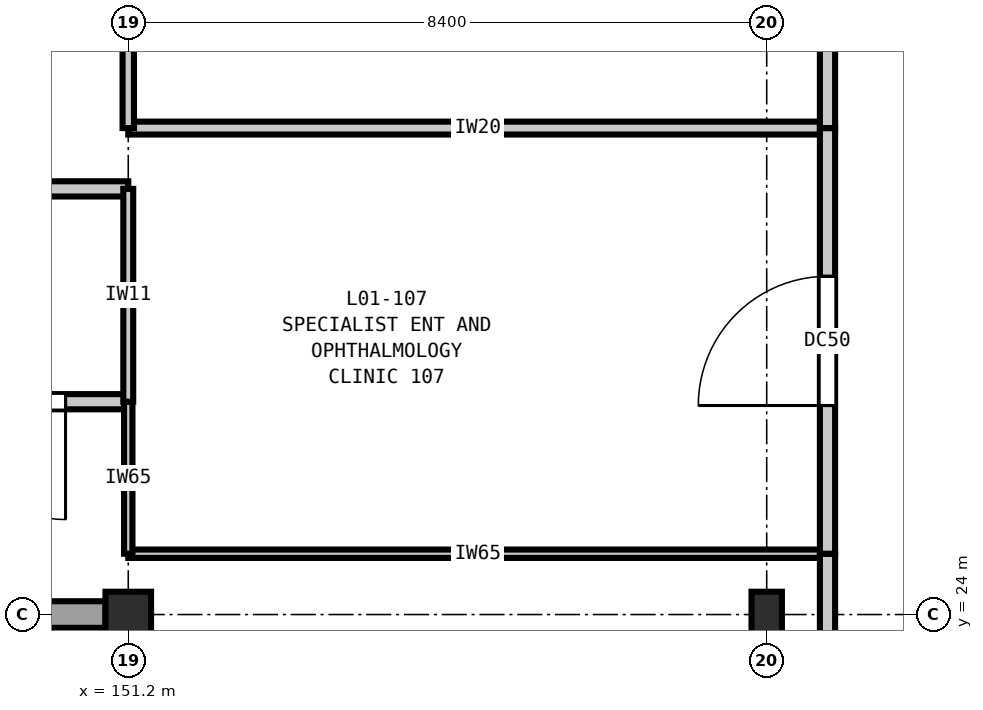
"""IFC4 building model, lengths in metres.
Left out: names, types, materials, properties, quantities, classifications, styles, units other than length and angle.
Written with IfcOpenShell. Run it as: python <this file> out.ifc"""

import sys

from ifc_helpers import new_model, si_unit, direction, frame, frame_2d, origin, origin_2d, place, context, subcontext, project, spatial, rectangle, extrude, element, fill, save


model = new_model("IFC4")
c1 = context("Model", 3, precision=1e-05, world=origin(), true_north=direction((0.0, 1.0)))
c2 = subcontext(c1, "Body", "Model", "MODEL_VIEW")
j1 = project(units=[si_unit("LENGTHUNIT", "METRE"), si_unit("PLANEANGLEUNIT", "RADIAN")], contexts=[c1])
p1 = place(None, origin())
s1 = spatial("IfcSite", under=j1, at=p1, CompositionType="ELEMENT")
p2 = place(p1, origin())
s2 = spatial("IfcBuilding", under=s1, at=p2, CompositionType="ELEMENT")
p3 = place(p2, frame((0.0, 0.0, 5.4)))
s3 = spatial("IfcBuildingStorey", under=s2, at=p3, CompositionType="ELEMENT", Elevation=5.4)
p4 = place(p3, frame((151.2, 24.0, 0.0), z_axis=(0.0, 0.0, 1.0), x_axis=(1.0, 0.0, 0.0)))
e1 = element("IfcColumn", 1, at=p4, inside=s3, PredefinedType="COLUMN", context=c2, shape_type="SweptSolid", body=[
    extrude(rectangle(XDim=0.6, YDim=0.6, at=origin_2d()), origin(), (0.0, 0.0, 1.0), 5.4),
])
p5 = place(p3, frame((159.6, 24.0, 0.0), z_axis=(0.0, 0.0, 1.0), x_axis=(1.0, 0.0, 0.0)))
e2 = element("IfcColumn", 2, at=p5, inside=s3, PredefinedType="COLUMN", context=c2, shape_type="SweptSolid", body=[
    extrude(rectangle(XDim=0.4, YDim=0.6, at=origin_2d()), origin(), (0.0, 0.0, 1.0), 5.4),
])
p6 = place(p3, frame((150.902, 24.0, 0.0), z_axis=(0.0, 0.0, 1.0), x_axis=(-1.0, 0.0, 0.0)))
e3 = element("IfcWall", 3, at=p6, inside=s3, PredefinedType="SOLIDWALL", context=c2, shape_type="SweptSolid", body=[
    extrude(rectangle(XDim=7.804, YDim=0.35, at=frame_2d((3.902, 0.0))), origin(), (0.0, 0.0, 1.0), 4.68),
])
p7 = place(p6, frame((4.557, 0.0, 0.9)))
e4 = element("IfcOpeningElement", 4, at=p7, cuts=e3, PredefinedType="OPENING", context=c2, shape_type="SweptSolid", body=[
    extrude(rectangle(XDim=1.2, YDim=1.55, at=frame_2d((0.6, 0.775))), frame((0.0, 0.185, 0.0), z_axis=(0.0, -1.0, 0.0), x_axis=(1.0, 0.0, 0.0)), (0.0, 0.0, 1.0), 0.37),
])
p8 = place(p3, frame((151.2, 24.8, 0.0), z_axis=(0.0, 0.0, 1.0), x_axis=(1.0, 0.0, 0.0)))
e5 = element("IfcWall", 5, at=p8, inside=s3, PredefinedType="PARTITIONING", context=c2, shape_type="SweptSolid", body=[
    extrude(rectangle(XDim=9.2, YDim=0.11, at=frame_2d((4.6, 0.0))), origin(), (0.0, 0.0, 1.0), 5.05),
])
p9 = place(p3, frame((148.0, 26.8, 0.0), z_axis=(0.0, 0.0, 1.0), x_axis=(1.0, 0.0, 0.0)))
e6 = element("IfcWall", 6, at=p9, inside=s3, PredefinedType="PARTITIONING", context=c2, shape_type="SweptSolid", body=[
    extrude(rectangle(XDim=3.2, YDim=0.2, at=frame_2d((1.6, 0.0))), origin(), (0.0, 0.0, 1.0), 5.05),
])
p10 = place(p9, frame((0.825, 0.0, 0.0)))
e7 = element("IfcOpeningElement", 7, at=p10, cuts=e6, PredefinedType="OPENING", context=c2, shape_type="SweptSolid", body=[
    extrude(rectangle(XDim=1.55, YDim=2.25, at=frame_2d((0.775, 1.125))), frame((0.0, 0.11, 0.0), z_axis=(0.0, -1.0, 0.0), x_axis=(1.0, 0.0, 0.0)), (0.0, 0.0, 1.0), 0.22),
])
p11 = place(p3, frame((141.2, 29.6, 0.0), z_axis=(0.0, 0.0, 1.0), x_axis=(1.0, 0.0, 0.0)))
e8 = element("IfcWall", 8, at=p11, inside=s3, PredefinedType="PARTITIONING", context=c2, shape_type="SweptSolid", body=[
    extrude(rectangle(XDim=10.0, YDim=0.2, at=frame_2d((5.0, 0.0))), origin(), (0.0, 0.0, 1.0), 5.05),
])
p12 = place(p11, frame((4.375, 0.0, 0.0)))
e9 = element("IfcOpeningElement", 9, at=p12, cuts=e8, PredefinedType="OPENING", context=c2, shape_type="SweptSolid", body=[
    extrude(rectangle(XDim=1.25, YDim=2.15, at=frame_2d((0.625, 1.075))), frame((0.0, 0.11, 0.0), z_axis=(0.0, -1.0, 0.0), x_axis=(1.0, 0.0, 0.0)), (0.0, 0.0, 1.0), 0.22),
])
p13 = place(p3, frame((151.2, 30.4, 0.0), z_axis=(0.0, 0.0, 1.0), x_axis=(1.0, 0.0, 0.0)))
e10 = element("IfcWall", 10, at=p13, inside=s3, PredefinedType="PARTITIONING", context=c2, shape_type="SweptSolid", body=[
    extrude(rectangle(XDim=9.2, YDim=0.17, at=frame_2d((4.6, 0.0))), origin(), (0.0, 0.0, 1.0), 5.05),
])
p14 = place(p3, frame((151.2, 24.8, 0.0), z_axis=(0.0, 0.0, 1.0), x_axis=(0.0, 1.0, 0.0)))
e11 = element("IfcWall", 11, at=p14, inside=s3, PredefinedType="PARTITIONING", context=c2, shape_type="SweptSolid", body=[
    extrude(rectangle(XDim=2.0, YDim=0.11, at=frame_2d((1.0, 0.0))), origin(), (0.0, 0.0, 1.0), 4.735),
])
p15 = place(p3, frame((151.2, 26.8, 0.0), z_axis=(0.0, 0.0, 1.0), x_axis=(0.0, 1.0, 0.0)))
e12 = element("IfcWall", 12, at=p15, inside=s3, PredefinedType="PARTITIONING", context=c2, shape_type="SweptSolid", body=[
    extrude(rectangle(XDim=2.8, YDim=0.13, at=frame_2d((1.4, 0.0))), origin(), (0.0, 0.0, 1.0), 4.735),
])
p16 = place(p3, frame((151.2, 30.4, 0.0), z_axis=(0.0, 0.0, 1.0), x_axis=(0.0, 1.0, 0.0)))
e13 = element("IfcWall", 13, at=p16, inside=s3, PredefinedType="PARTITIONING", context=c2, shape_type="SweptSolid", body=[
    extrude(rectangle(XDim=1.685, YDim=0.15, at=frame_2d((0.843, 0.0))), origin(), (0.0, 0.0, 1.0), 4.735),
])
p17 = place(p3, frame((160.4, 15.2, 0.0), z_axis=(0.0, 0.0, 1.0), x_axis=(0.0, 1.0, 0.0)))
e14 = element("IfcWall", 14, at=p17, inside=s3, PredefinedType="PARTITIONING", context=c2, shape_type="SweptSolid", body=[
    extrude(rectangle(XDim=9.6, YDim=0.2, at=frame_2d((4.8, 0.0))), origin(), (0.0, 0.0, 1.0), 5.05),
])
p18 = place(p17, frame((4.025, 0.0, 0.0)))
e15 = element("IfcOpeningElement", 15, at=p18, cuts=e14, PredefinedType="OPENING", context=c2, shape_type="SweptSolid", body=[
    extrude(rectangle(XDim=1.55, YDim=2.25, at=frame_2d((0.775, 1.125))), frame((0.0, 0.11, 0.0), z_axis=(0.0, -1.0, 0.0), x_axis=(1.0, 0.0, 0.0)), (0.0, 0.0, 1.0), 0.22),
])
p19 = place(p3, frame((160.4, 24.8, 0.0), z_axis=(0.0, 0.0, 1.0), x_axis=(0.0, 1.0, 0.0)))
e16 = element("IfcWall", 16, at=p19, inside=s3, PredefinedType="PARTITIONING", context=c2, shape_type="SweptSolid", body=[
    extrude(rectangle(XDim=5.6, YDim=0.2, at=frame_2d((2.8, 0.0))), origin(), (0.0, 0.0, 1.0), 5.05),
])
p20 = place(p19, frame((1.95, 0.0, 0.0)))
e17 = element("IfcOpeningElement", 17, at=p20, cuts=e16, PredefinedType="OPENING", context=c2, shape_type="SweptSolid", body=[
    extrude(rectangle(XDim=1.7, YDim=2.3, at=frame_2d((0.85, 1.15))), frame((0.0, 0.11, 0.0), z_axis=(0.0, -1.0, 0.0), x_axis=(1.0, 0.0, 0.0)), (0.0, 0.0, 1.0), 0.22),
])
p21 = place(p3, frame((160.4, 30.4, 0.0), z_axis=(0.0, 0.0, 1.0), x_axis=(0.0, 1.0, 0.0)))
e18 = element("IfcWall", 18, at=p21, inside=s3, PredefinedType="PARTITIONING", context=c2, shape_type="SweptSolid", body=[
    extrude(rectangle(XDim=9.6, YDim=0.2, at=frame_2d((4.8, 0.0))), origin(), (0.0, 0.0, 1.0), 5.05),
])
p22 = place(p21, frame((3.875, 0.0, 0.0)))
e19 = element("IfcOpeningElement", 19, at=p22, cuts=e18, PredefinedType="OPENING", context=c2, shape_type="SweptSolid", body=[
    extrude(rectangle(XDim=1.85, YDim=2.3, at=frame_2d((0.925, 1.15))), frame((0.0, 0.11, 0.0), z_axis=(0.0, -1.0, 0.0), x_axis=(1.0, 0.0, 0.0)), (0.0, 0.0, 1.0), 0.22),
])
p23 = place(p10, frame((1.55, 0.0, 0.0), z_axis=(0.0, 0.0, 1.0), x_axis=(-1.0, 0.0, 0.0)))
e20 = element("IfcDoor", 20, at=p23, inside=s3, OperationType="SINGLE_SWING_LEFT", PredefinedType="DOOR", context=c2, shape_type="SweptSolid", body=[
    extrude(rectangle(XDim=1.55, YDim=2.25, at=frame_2d((0.775, 1.125))), frame((0.0, 0.025, 0.0), z_axis=(0.0, -1.0, 0.0), x_axis=(1.0, 0.0, 0.0)), (0.0, 0.0, 1.0), 0.05),
])
fill(e7, e20)
p24 = place(p20, origin())
e21 = element("IfcDoor", 21, at=p24, inside=s3, OperationType="SINGLE_SWING_LEFT", PredefinedType="DOOR", context=c2, shape_type="SweptSolid", body=[
    extrude(rectangle(XDim=1.7, YDim=2.3, at=frame_2d((0.85, 1.15))), frame((0.0, 0.025, 0.0), z_axis=(0.0, -1.0, 0.0), x_axis=(1.0, 0.0, 0.0)), (0.0, 0.0, 1.0), 0.05),
])
fill(e17, e21)
save(model, sys.argv[1])
